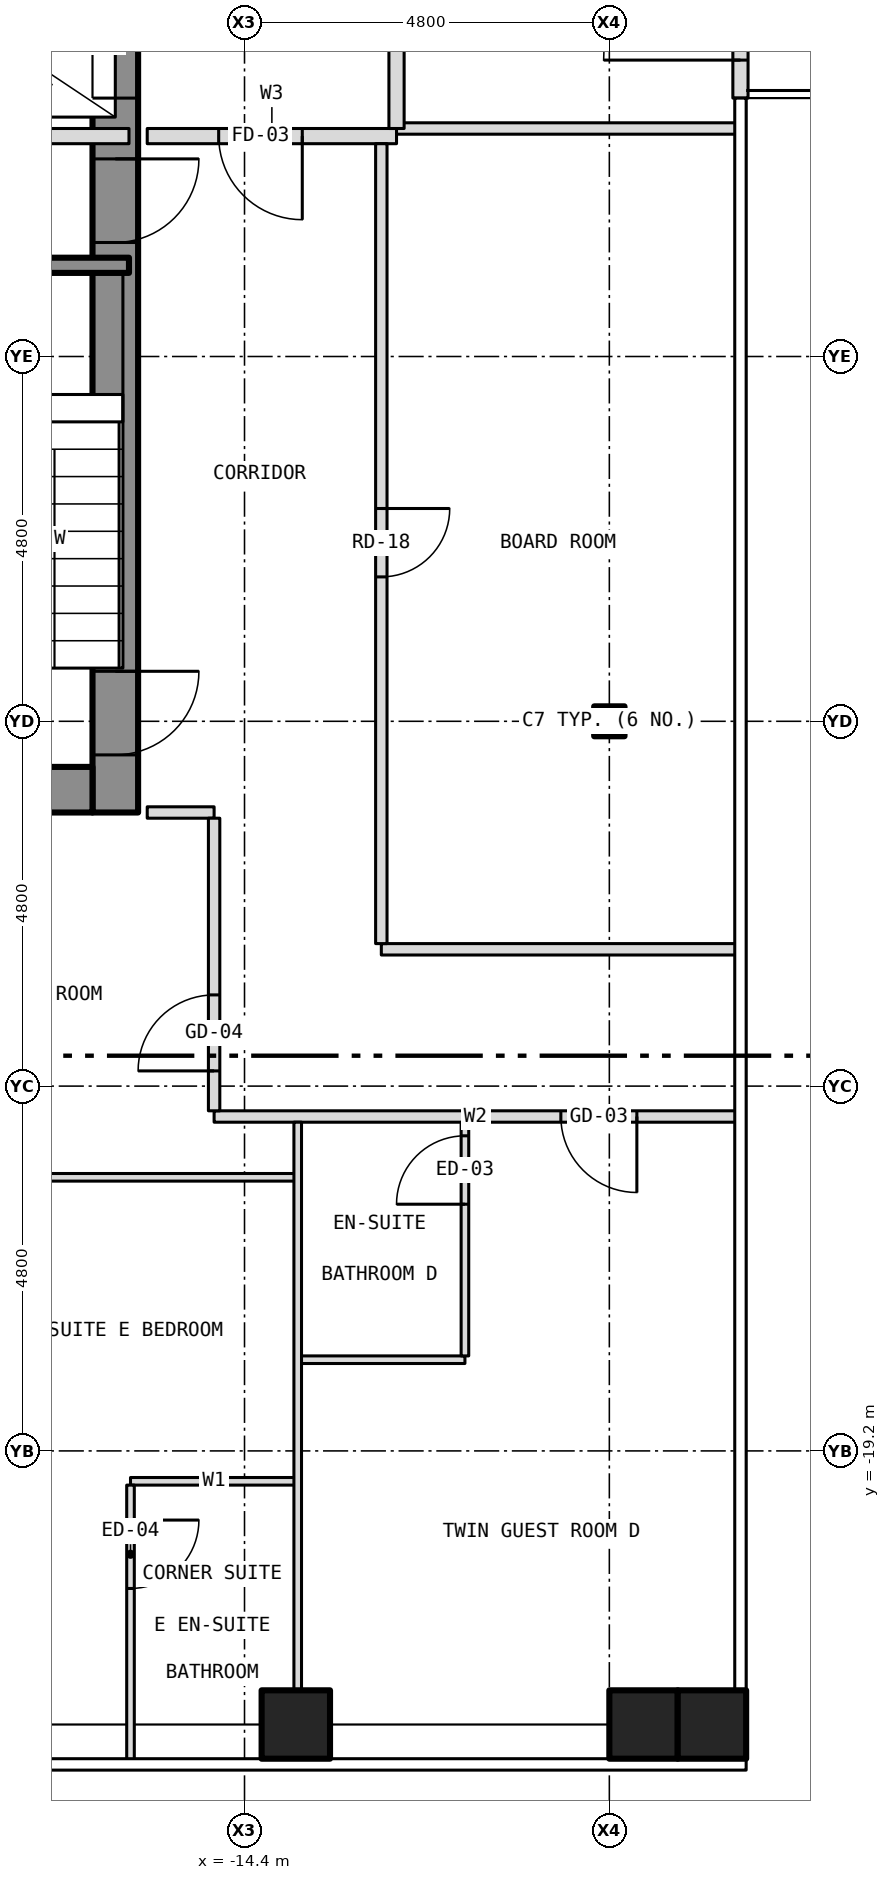
"""IFC4 building model, lengths in metres.
Left out: names, types, materials, properties, quantities, classifications, styles, units other than length and angle.
Written with IfcOpenShell. Run it as: python <this file> out.ifc"""

import sys

from ifc_helpers import new_model, si_unit, direction, frame, frame_2d, origin, origin_2d, place, context, subcontext, project, spatial, rectangle, hollow_rectangle, i_section, extrude, element, fill, save


model = new_model("IFC4")
c1 = context("Model", 3, precision=1e-05, world=origin(), true_north=direction((0.0, 1.0)))
c2 = subcontext(c1, "Body", "Model", "MODEL_VIEW")
j1 = project(units=[si_unit("LENGTHUNIT", "METRE"), si_unit("PLANEANGLEUNIT", "RADIAN")], contexts=[c1])
p1 = place(None, origin())
s1 = spatial("IfcSite", under=j1, at=p1, CompositionType="ELEMENT")
p2 = place(p1, origin())
s2 = spatial("IfcBuilding", under=s1, at=p2, CompositionType="ELEMENT")
p3 = place(p2, frame((0.0, 0.0, 134.5)))
s3 = spatial("IfcBuildingStorey", under=s2, at=p3, CompositionType="ELEMENT", Elevation=134.5)
for number, where, z_axis, x_axis in (
    (1, (-13.725, -22.8, -0.15), (0.0, 0.0, 1.0), (1.0, 0.0, 0.0)),
    (2, (-9.15, -22.8, -0.15), (0.0, 0.0, 1.0), (1.0, 0.0, 0.0)),
    (3, (-8.25, -22.8, -0.15), (0.0, 0.0, 1.0), (1.0, 0.0, 0.0)),
):
    element("IfcColumn", number, at=place(p3, frame(where, z_axis=z_axis, x_axis=x_axis)), inside=s3, PredefinedType="COLUMN", context=c2, shape_type="SweptSolid", body=[
        extrude(hollow_rectangle(XDim=0.9, YDim=0.9, WallThickness=0.05, at=origin_2d()), origin(), (0.0, 0.0, 1.0), 3.35),
    ])
p4 = place(p3, frame((-9.6, -9.6, -0.15), z_axis=(0.0, 0.0, 1.0), x_axis=(1.0, 0.0, 0.0)))
e4 = element("IfcColumn", 4, at=p4, inside=s3, PredefinedType="COLUMN", context=c2, shape_type="SweptSolid", body=[
    extrude(i_section(OverallWidth=0.399, OverallDepth=0.394, WebThickness=0.023, FlangeThickness=0.037, at=origin_2d()), origin(), (0.0, 0.0, 1.0), 3.35),
])
p5 = place(p3, frame((-16.1, -10.8, 0.0), z_axis=(0.0, 0.0, 1.0), x_axis=(0.0, 1.0, 0.0)))
e5 = element("IfcWall", 5, at=p5, inside=s3, PredefinedType="SHEAR", context=c2, shape_type="SweptSolid", body=[
    extrude(rectangle(XDim=21.6, YDim=0.6, at=frame_2d((10.8, 0.0))), origin(), (0.0, 0.0, 1.0), 2.9),
])
p6 = place(p5, frame((9.4, 0.0, 0.0)))
e6 = element("IfcOpeningElement", 6, at=p6, cuts=e5, PredefinedType="OPENING", context=c2, shape_type="SweptSolid", body=[
    extrude(rectangle(XDim=1.1, YDim=2.1, at=frame_2d((0.55, 1.05))), frame((0.0, 0.312, 0.0), z_axis=(0.0, -1.0, 0.0), x_axis=(1.0, 0.0, 0.0)), (0.0, 0.0, 1.0), 0.624),
])
p7 = place(p5, frame((11.5, 0.0, 0.0)))
e7 = element("IfcOpeningElement", 7, at=p7, cuts=e5, PredefinedType="OPENING", context=c2, shape_type="SweptSolid", body=[
    extrude(rectangle(XDim=1.1, YDim=2.1, at=frame_2d((0.55, 1.05))), frame((0.0, 0.312, 0.0), z_axis=(0.0, -1.0, 0.0), x_axis=(1.0, 0.0, 0.0)), (0.0, 0.0, 1.0), 0.624),
])
p8 = place(p5, frame((13.6, 0.0, 0.0)))
e8 = element("IfcOpeningElement", 8, at=p8, cuts=e5, PredefinedType="OPENING", context=c2, shape_type="SweptSolid", body=[
    extrude(rectangle(XDim=1.1, YDim=2.1, at=frame_2d((0.55, 1.05))), frame((0.0, 0.312, 0.0), z_axis=(0.0, -1.0, 0.0), x_axis=(1.0, 0.0, 0.0)), (0.0, 0.0, 1.0), 0.624),
])
p9 = place(p5, frame((15.7, 0.0, 0.0)))
e9 = element("IfcOpeningElement", 9, at=p9, cuts=e5, PredefinedType="OPENING", context=c2, shape_type="SweptSolid", body=[
    extrude(rectangle(XDim=1.1, YDim=2.1, at=frame_2d((0.55, 1.05))), frame((0.0, 0.312, 0.0), z_axis=(0.0, -1.0, 0.0), x_axis=(1.0, 0.0, 0.0)), (0.0, 0.0, 1.0), 0.624),
])
p10 = place(p5, frame((17.8, 0.0, 0.0)))
e10 = element("IfcOpeningElement", 10, at=p10, cuts=e5, PredefinedType="OPENING", context=c2, shape_type="SweptSolid", body=[
    extrude(rectangle(XDim=1.1, YDim=2.1, at=frame_2d((0.55, 1.05))), frame((0.0, 0.312, 0.0), z_axis=(0.0, -1.0, 0.0), x_axis=(1.0, 0.0, 0.0)), (0.0, 0.0, 1.0), 0.624),
])
p11 = place(p5, frame((0.758, 0.0, 0.0)))
e11 = element("IfcOpeningElement", 11, at=p11, cuts=e5, PredefinedType="OPENING", context=c2, shape_type="SweptSolid", body=[
    extrude(rectangle(XDim=1.1, YDim=2.1, at=frame_2d((0.55, 1.05))), frame((0.0, 0.312, 0.0), z_axis=(0.0, -1.0, 0.0), x_axis=(1.0, 0.0, 0.0)), (0.0, 0.0, 1.0), 0.624),
])
p12 = place(p5, frame((7.5, 0.0, 0.0)))
e12 = element("IfcOpeningElement", 12, at=p12, cuts=e5, PredefinedType="OPENING", context=c2, shape_type="SweptSolid", body=[
    extrude(rectangle(XDim=1.1, YDim=2.1, at=frame_2d((0.55, 1.05))), frame((0.0, 0.312, 0.0), z_axis=(0.0, -1.0, 0.0), x_axis=(1.0, 0.0, 0.0)), (0.0, 0.0, 1.0), 0.624),
])
p13 = place(p3, frame((-22.2, -10.5, 0.0), z_axis=(0.0, 0.0, 1.0), x_axis=(1.0, 0.0, 0.0)))
e13 = element("IfcWall", 13, at=p13, inside=s3, PredefinedType="SHEAR", context=c2, shape_type="SweptSolid", body=[
    extrude(rectangle(XDim=5.8, YDim=0.6, at=frame_2d((2.9, 0.0))), origin(), (0.0, 0.0, 1.0), 2.9),
])
p14 = place(p3, frame((-7.875, -1.4, 0.0), z_axis=(0.0, 0.0, 1.0), x_axis=(0.0, 1.0, 0.0)))
e14 = element("IfcWall", 14, at=p14, inside=s3, PredefinedType="SOLIDWALL", context=c2, shape_type="SweptSolid", body=[
    extrude(rectangle(XDim=2.8, YDim=0.2, at=frame_2d((1.4, 0.0))), origin(), (0.0, 0.0, 1.0), 3.5),
])
p15 = place(p14, frame((0.5, 0.0, 0.0)))
e15 = element("IfcOpeningElement", 15, at=p15, cuts=e14, PredefinedType="OPENING", context=c2, shape_type="SweptSolid", body=[
    extrude(rectangle(XDim=1.8, YDim=2.1, at=frame_2d((0.9, 1.05))), frame((0.0, 0.112, 0.0), z_axis=(0.0, -1.0, 0.0), x_axis=(1.0, 0.0, 0.0)), (0.0, 0.0, 1.0), 0.224),
])
for number, where, z_axis, x_axis in (
    (16, (-15.9, -19.6, 0.0), (0.0, 0.0, 1.0), (1.0, 0.0, 0.0)),
    (17, (-13.7, -18.0, 0.0), (0.0, 0.0, 1.0), (1.0, 0.0, 0.0)),
):
    element("IfcWall", number, at=place(p3, frame(where, z_axis=z_axis, x_axis=x_axis)), inside=s3, PredefinedType="PARTITIONING", context=c2, shape_type="SweptSolid", body=[
        extrude(rectangle(XDim=2.2, YDim=0.1, at=frame_2d((1.1, 0.0))), origin(), (0.0, 0.0, 1.0), 3.2),
    ])
p16 = place(p3, frame((-23.28, -15.6, 0.0), z_axis=(0.0, 0.0, 1.0), x_axis=(1.0, 0.0, 0.0)))
e18 = element("IfcWall", 18, at=p16, inside=s3, PredefinedType="PARTITIONING", context=c2, shape_type="SweptSolid", body=[
    extrude(rectangle(XDim=9.58, YDim=0.1, at=frame_2d((4.79, 0.0))), origin(), (0.0, 0.0, 1.0), 3.2),
])
p17 = place(p16, frame((4.568, 0.0, 0.0)))
e19 = element("IfcOpeningElement", 19, at=p17, cuts=e18, PredefinedType="OPENING", context=c2, shape_type="SweptSolid", body=[
    extrude(rectangle(XDim=0.9, YDim=2.1, at=frame_2d((0.45, 1.05))), frame((0.0, 0.062, 0.0), z_axis=(0.0, -1.0, 0.0), x_axis=(1.0, 0.0, 0.0)), (0.0, 0.0, 1.0), 0.124),
])
p18 = place(p3, frame((-14.8, -14.8, 0.0), z_axis=(0.0, 0.0, 1.0), x_axis=(1.0, 0.0, 0.0)))
e20 = element("IfcWall", 20, at=p18, inside=s3, PredefinedType="PARTITIONING", context=c2, shape_type="SweptSolid", body=[
    extrude(rectangle(XDim=6.88, YDim=0.15, at=frame_2d((3.44, 0.0))), origin(), (0.0, 0.0, 1.0), 3.2),
])
p19 = place(p18, frame((4.562, 0.0, 0.0)))
e21 = element("IfcOpeningElement", 21, at=p19, cuts=e20, PredefinedType="OPENING", context=c2, shape_type="SweptSolid", body=[
    extrude(rectangle(XDim=1.0, YDim=2.1, at=frame_2d((0.5, 1.05))), frame((0.0, 0.087, 0.0), z_axis=(0.0, -1.0, 0.0), x_axis=(1.0, 0.0, 0.0)), (0.0, 0.0, 1.0), 0.174),
])
p20 = place(p3, frame((-12.6, -12.6, 0.0), z_axis=(0.0, 0.0, 1.0), x_axis=(1.0, 0.0, 0.0)))
e22 = element("IfcWall", 22, at=p20, inside=s3, PredefinedType="PARTITIONING", context=c2, shape_type="SweptSolid", body=[
    extrude(rectangle(XDim=4.68, YDim=0.15, at=frame_2d((2.34, 0.0))), origin(), (0.0, 0.0, 1.0), 3.2),
])
p21 = place(p3, frame((-15.68, -10.8, 0.0), z_axis=(0.0, 0.0, 1.0), x_axis=(1.0, 0.0, 0.0)))
e23 = element("IfcWall", 23, at=p21, inside=s3, PredefinedType="PARTITIONING", context=c2, shape_type="SweptSolid", body=[
    extrude(rectangle(XDim=0.88, YDim=0.15, at=frame_2d((0.44, 0.0))), origin(), (0.0, 0.0, 1.0), 3.2),
])
p22 = place(p3, frame((-20.0, -3.6, 0.0), z_axis=(0.0, 0.0, 1.0), x_axis=(1.0, 0.0, 0.0)))
e24 = element("IfcWall", 24, at=p22, inside=s3, PredefinedType="SHEAR", context=c2, shape_type="SweptSolid", body=[
    extrude(rectangle(XDim=4.08, YDim=0.2, at=frame_2d((2.04, 0.0))), origin(), (0.0, 0.0, 1.0), 2.9),
])
p23 = place(p3, frame((-22.68, -1.9, 0.0), z_axis=(0.0, 0.0, 1.0), x_axis=(1.0, 0.0, 0.0)))
e25 = element("IfcWall", 25, at=p23, inside=s3, PredefinedType="PARTITIONING", context=c2, shape_type="SweptSolid", body=[
    extrude(rectangle(XDim=6.76, YDim=0.2, at=frame_2d((3.38, 0.0))), origin(), (0.0, 0.0, 1.0), 2.9),
])
p24 = place(p23, frame((2.12, 0.0, 0.0)))
e26 = element("IfcOpeningElement", 26, at=p24, cuts=e25, PredefinedType="OPENING", context=c2, shape_type="SweptSolid", body=[
    extrude(rectangle(XDim=0.9, YDim=2.1, at=frame_2d((0.45, 1.05))), frame((0.0, 0.112, 0.0), z_axis=(0.0, -1.0, 0.0), x_axis=(1.0, 0.0, 0.0)), (0.0, 0.0, 1.0), 0.224),
])
p25 = place(p3, frame((-15.68, -1.9, 0.0), z_axis=(0.0, 0.0, 1.0), x_axis=(1.0, 0.0, 0.0)))
e27 = element("IfcWall", 27, at=p25, inside=s3, PredefinedType="PARTITIONING", context=c2, shape_type="SweptSolid", body=[
    extrude(rectangle(XDim=3.28, YDim=0.2, at=frame_2d((1.64, 0.0))), origin(), (0.0, 0.0, 1.0), 3.2),
])
p26 = place(p25, frame((0.94, 0.0, 0.0)))
e28 = element("IfcOpeningElement", 28, at=p26, cuts=e27, PredefinedType="OPENING", context=c2, shape_type="SweptSolid", body=[
    extrude(rectangle(XDim=1.1, YDim=2.1, at=frame_2d((0.55, 1.05))), frame((0.0, 0.112, 0.0), z_axis=(0.0, -1.0, 0.0), x_axis=(1.0, 0.0, 0.0)), (0.0, 0.0, 1.0), 0.224),
])
p27 = place(p3, frame((-12.4, -1.8, 0.0), z_axis=(0.0, 0.0, 1.0), x_axis=(1.0, 0.0, 0.0)))
e29 = element("IfcWall", 29, at=p27, inside=s3, PredefinedType="PARTITIONING", context=c2, shape_type="SweptSolid", body=[
    extrude(rectangle(XDim=4.48, YDim=0.15, at=frame_2d((2.24, 0.0))), origin(), (0.0, 0.0, 1.0), 3.2),
])
p28 = place(p3, frame((-15.9, -23.28, 0.0), z_axis=(0.0, 0.0, 1.0), x_axis=(0.0, 1.0, 0.0)))
e30 = element("IfcWall", 30, at=p28, inside=s3, PredefinedType="PARTITIONING", context=c2, shape_type="SweptSolid", body=[
    extrude(rectangle(XDim=3.63, YDim=0.1, at=frame_2d((1.815, 0.0))), origin(), (0.0, 0.0, 1.0), 3.2),
])
p29 = place(p28, frame((2.27, 0.0, 0.0)))
e31 = element("IfcOpeningElement", 31, at=p29, cuts=e30, PredefinedType="OPENING", context=c2, shape_type="SweptSolid", body=[
    extrude(rectangle(XDim=0.9, YDim=2.1, at=frame_2d((0.45, 1.05))), frame((0.0, 0.062, 0.0), z_axis=(0.0, -1.0, 0.0), x_axis=(1.0, 0.0, 0.0)), (0.0, 0.0, 1.0), 0.124),
])
p30 = place(p3, frame((-14.8, -14.725, 0.0), z_axis=(0.0, 0.0, 1.0), x_axis=(0.0, 1.0, 0.0)))
e32 = element("IfcWall", 32, at=p30, inside=s3, PredefinedType="PARTITIONING", context=c2, shape_type="SweptSolid", body=[
    extrude(rectangle(XDim=3.85, YDim=0.15, at=frame_2d((1.925, 0.0))), origin(), (0.0, 0.0, 1.0), 3.2),
])
p31 = place(p30, frame((0.525, 0.0, 0.0)))
e33 = element("IfcOpeningElement", 33, at=p31, cuts=e32, PredefinedType="OPENING", context=c2, shape_type="SweptSolid", body=[
    extrude(rectangle(XDim=1.0, YDim=2.1, at=frame_2d((0.5, 1.05))), frame((0.0, 0.087, 0.0), z_axis=(0.0, -1.0, 0.0), x_axis=(1.0, 0.0, 0.0)), (0.0, 0.0, 1.0), 0.174),
])
p32 = place(p3, frame((-13.7, -22.68, 0.0), z_axis=(0.0, 0.0, 1.0), x_axis=(0.0, 1.0, 0.0)))
e34 = element("IfcWall", 34, at=p32, inside=s3, PredefinedType="PARTITIONING", context=c2, shape_type="SweptSolid", body=[
    extrude(rectangle(XDim=7.805, YDim=0.1, at=frame_2d((3.902, 0.0))), origin(), (0.0, 0.0, 1.0), 3.2),
])
p33 = place(p3, frame((-12.6, -12.525, 0.0), z_axis=(0.0, 0.0, 1.0), x_axis=(0.0, 1.0, 0.0)))
e35 = element("IfcWall", 35, at=p33, inside=s3, PredefinedType="PARTITIONING", context=c2, shape_type="SweptSolid", body=[
    extrude(rectangle(XDim=10.525, YDim=0.15, at=frame_2d((5.262, 0.0))), origin(), (0.0, 0.0, 1.0), 3.2),
])
p34 = place(p33, frame((4.825, 0.0, 0.0)))
e36 = element("IfcOpeningElement", 36, at=p34, cuts=e35, PredefinedType="OPENING", context=c2, shape_type="SweptSolid", body=[
    extrude(rectangle(XDim=0.9, YDim=2.1, at=frame_2d((0.45, 1.05))), frame((0.0, 0.087, 0.0), z_axis=(0.0, -1.0, 0.0), x_axis=(1.0, 0.0, 0.0)), (0.0, 0.0, 1.0), 0.174),
])
p35 = place(p3, frame((-12.4, -1.8, 0.0), z_axis=(0.0, 0.0, 1.0), x_axis=(0.0, 1.0, 0.0)))
e37 = element("IfcWall", 37, at=p35, inside=s3, PredefinedType="PARTITIONING", context=c2, shape_type="SweptSolid", body=[
    extrude(rectangle(XDim=4.0, YDim=0.2, at=frame_2d((2.0, 0.0))), origin(), (0.0, 0.0, 1.0), 3.2),
])
p36 = place(p35, frame((1.25, 0.0, 0.0)))
e38 = element("IfcOpeningElement", 38, at=p36, cuts=e37, PredefinedType="OPENING", context=c2, shape_type="SweptSolid", body=[
    extrude(rectangle(XDim=1.1, YDim=2.1, at=frame_2d((0.55, 1.05))), frame((0.0, 0.112, 0.0), z_axis=(0.0, -1.0, 0.0), x_axis=(1.0, 0.0, 0.0)), (0.0, 0.0, 1.0), 0.224),
])
p37 = place(p3, frame((-11.5, -17.95, 0.0), z_axis=(0.0, 0.0, 1.0), x_axis=(0.0, 1.0, 0.0)))
e39 = element("IfcWall", 39, at=p37, inside=s3, PredefinedType="PARTITIONING", context=c2, shape_type="SweptSolid", body=[
    extrude(rectangle(XDim=3.075, YDim=0.1, at=frame_2d((1.538, 0.0))), origin(), (0.0, 0.0, 1.0), 3.2),
])
p38 = place(p37, frame((1.996, 0.0, 0.0)))
e40 = element("IfcOpeningElement", 40, at=p38, cuts=e39, PredefinedType="OPENING", context=c2, shape_type="SweptSolid", body=[
    extrude(rectangle(XDim=0.9, YDim=2.1, at=frame_2d((0.45, 1.05))), frame((0.0, 0.062, 0.0), z_axis=(0.0, -1.0, 0.0), x_axis=(1.0, 0.0, 0.0)), (0.0, 0.0, 1.0), 0.124),
])
p39 = place(p15, origin())
e41 = element("IfcDoor", 41, at=p39, inside=s3, OperationType="DOUBLE_DOOR_DOUBLE_SWING", PredefinedType="DOOR", context=c2, shape_type="SweptSolid", body=[
    extrude(rectangle(XDim=1.8, YDim=2.1, at=frame_2d((0.9, 1.05))), frame((0.0, 0.025, 0.0), z_axis=(0.0, -1.0, 0.0), x_axis=(1.0, 0.0, 0.0)), (0.0, 0.0, 1.0), 0.05),
])
fill(e15, e41)
p40 = place(p6, origin())
e42 = element("IfcDoor", 42, at=p40, inside=s3, OperationType="SLIDING_TO_LEFT", PredefinedType="DOOR", context=c2, shape_type="SweptSolid", body=[
    extrude(rectangle(XDim=1.1, YDim=2.1, at=frame_2d((0.55, 1.05))), frame((0.0, 0.025, 0.0), z_axis=(0.0, -1.0, 0.0), x_axis=(1.0, 0.0, 0.0)), (0.0, 0.0, 1.0), 0.05),
])
fill(e6, e42)
p41 = place(p11, origin())
e43 = element("IfcDoor", 43, at=p41, inside=s3, OperationType="SINGLE_SWING_RIGHT", PredefinedType="DOOR", context=c2, shape_type="SweptSolid", body=[
    extrude(rectangle(XDim=1.1, YDim=2.1, at=frame_2d((0.55, 1.05))), frame((0.0, 0.025, 0.0), z_axis=(0.0, -1.0, 0.0), x_axis=(1.0, 0.0, 0.0)), (0.0, 0.0, 1.0), 0.05),
])
fill(e11, e43)
p42 = place(p12, origin())
e44 = element("IfcDoor", 44, at=p42, inside=s3, OperationType="SINGLE_SWING_RIGHT", PredefinedType="DOOR", context=c2, shape_type="SweptSolid", body=[
    extrude(rectangle(XDim=1.1, YDim=2.1, at=frame_2d((0.55, 1.05))), frame((0.0, 0.025, 0.0), z_axis=(0.0, -1.0, 0.0), x_axis=(1.0, 0.0, 0.0)), (0.0, 0.0, 1.0), 0.05),
])
fill(e12, e44)
p43 = place(p26, origin())
e45 = element("IfcDoor", 45, at=p43, inside=s3, OperationType="SINGLE_SWING_RIGHT", PredefinedType="DOOR", context=c2, shape_type="SweptSolid", body=[
    extrude(rectangle(XDim=1.1, YDim=2.1, at=frame_2d((0.55, 1.05))), frame((0.0, 0.025, 0.0), z_axis=(0.0, -1.0, 0.0), x_axis=(1.0, 0.0, 0.0)), (0.0, 0.0, 1.0), 0.05),
])
fill(e28, e45)
p44 = place(p19, origin())
e46 = element("IfcDoor", 46, at=p44, inside=s3, OperationType="SINGLE_SWING_RIGHT", PredefinedType="DOOR", context=c2, shape_type="SweptSolid", body=[
    extrude(rectangle(XDim=1.0, YDim=2.1, at=frame_2d((0.5, 1.05))), frame((0.0, 0.025, 0.0), z_axis=(0.0, -1.0, 0.0), x_axis=(1.0, 0.0, 0.0)), (0.0, 0.0, 1.0), 0.05),
])
fill(e21, e46)
p45 = place(p38, origin())
e47 = element("IfcDoor", 47, at=p45, inside=s3, OperationType="SINGLE_SWING_LEFT", PredefinedType="DOOR", context=c2, shape_type="SweptSolid", body=[
    extrude(rectangle(XDim=0.9, YDim=2.1, at=frame_2d((0.45, 1.05))), frame((0.0, 0.025, 0.0), z_axis=(0.0, -1.0, 0.0), x_axis=(1.0, 0.0, 0.0)), (0.0, 0.0, 1.0), 0.05),
])
fill(e40, e47)
p46 = place(p31, origin())
e48 = element("IfcDoor", 48, at=p46, inside=s3, OperationType="SINGLE_SWING_LEFT", PredefinedType="DOOR", context=c2, shape_type="SweptSolid", body=[
    extrude(rectangle(XDim=1.0, YDim=2.1, at=frame_2d((0.5, 1.05))), frame((0.0, 0.025, 0.0), z_axis=(0.0, -1.0, 0.0), x_axis=(1.0, 0.0, 0.0)), (0.0, 0.0, 1.0), 0.05),
])
fill(e33, e48)
p47 = place(p29, origin())
e49 = element("IfcDoor", 49, at=p47, inside=s3, OperationType="SINGLE_SWING_RIGHT", PredefinedType="DOOR", context=c2, shape_type="SweptSolid", body=[
    extrude(rectangle(XDim=0.9, YDim=2.1, at=frame_2d((0.45, 1.05))), frame((0.0, 0.025, 0.0), z_axis=(0.0, -1.0, 0.0), x_axis=(1.0, 0.0, 0.0)), (0.0, 0.0, 1.0), 0.05),
])
fill(e31, e49)
p48 = place(p34, origin())
e50 = element("IfcDoor", 50, at=p48, inside=s3, OperationType="SINGLE_SWING_RIGHT", PredefinedType="DOOR", context=c2, shape_type="SweptSolid", body=[
    extrude(rectangle(XDim=0.9, YDim=2.1, at=frame_2d((0.45, 1.05))), frame((0.0, 0.025, 0.0), z_axis=(0.0, -1.0, 0.0), x_axis=(1.0, 0.0, 0.0)), (0.0, 0.0, 1.0), 0.05),
])
fill(e36, e50)
save(model, sys.argv[1])
